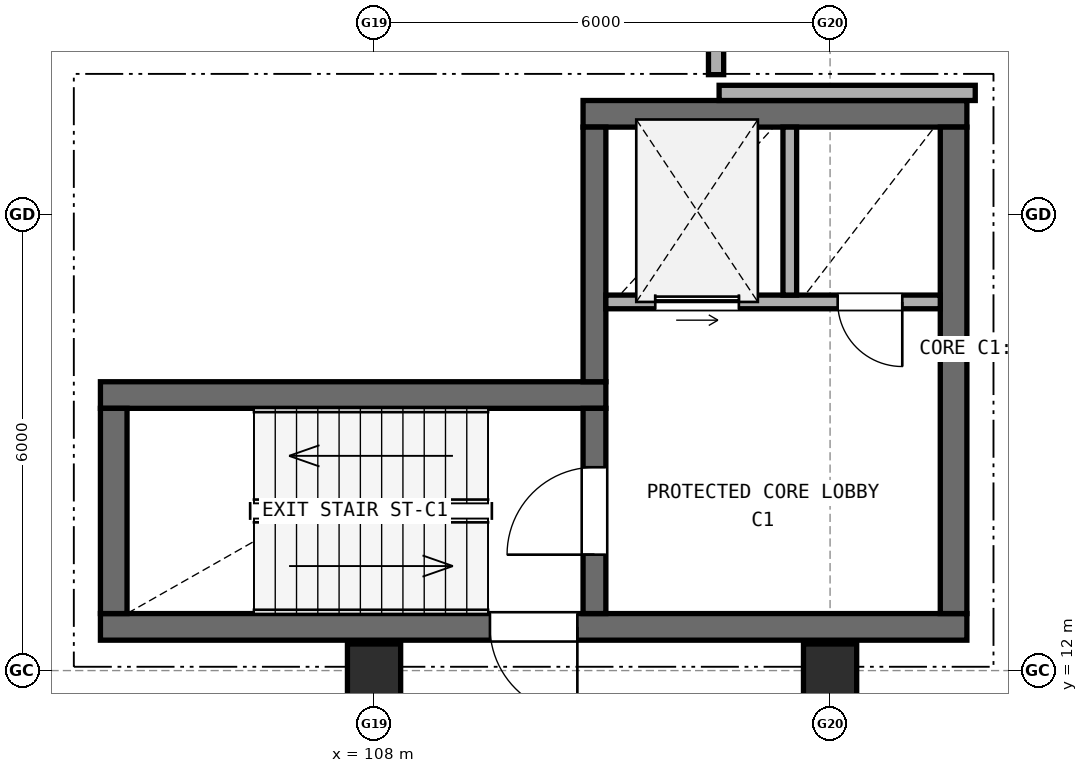
"""IFC4 building model, lengths in metres.
Left out: names, types, materials, properties, quantities, classifications, styles, units other than length and angle.
Written with IfcOpenShell. Run it as: python <this file> out.ifc"""

import sys

from ifc_helpers import new_model, si_unit, direction, frame, frame_2d, origin, origin_2d, place, context, subcontext, project, spatial, rectangle, extrude, element, fill, save


model = new_model("IFC4")
c1 = context("Model", 3, precision=1e-05, world=origin(), true_north=direction((0.0, 1.0)))
c2 = subcontext(c1, "Body", "Model", "MODEL_VIEW")
j1 = project(units=[si_unit("LENGTHUNIT", "METRE"), si_unit("PLANEANGLEUNIT", "RADIAN")], contexts=[c1])
p1 = place(None, origin())
s1 = spatial("IfcSite", under=j1, at=p1, CompositionType="ELEMENT")
p2 = place(p1, origin())
s2 = spatial("IfcBuilding", under=s1, at=p2, CompositionType="ELEMENT")
p3 = place(p2, origin())
s3 = spatial("IfcBuildingStorey", under=s2, at=p3, CompositionType="ELEMENT", Elevation=0.0)
for number, where, z_axis, x_axis in (
    (1, (108.0, 12.0, 0.0), (0.0, 0.0, 1.0), (1.0, 0.0, 0.0)),
    (2, (114.0, 12.0, 0.0), (0.0, 0.0, 1.0), (1.0, 0.0, 0.0)),
):
    element("IfcColumn", number, at=place(p3, frame(where, z_axis=z_axis, x_axis=x_axis)), inside=s3, PredefinedType="COLUMN", context=c2, shape_type="SweptSolid", body=[
        extrude(rectangle(XDim=0.7, YDim=0.7, at=origin_2d()), origin(), (0.0, 0.0, 1.0), 4.23),
    ])
p4 = place(p3, frame((104.4, 12.575, 0.0), z_axis=(0.0, 0.0, 1.0), x_axis=(1.0, 0.0, 0.0)))
e3 = element("IfcWall", 3, at=p4, inside=s3, PredefinedType="SHEAR", context=c2, shape_type="SweptSolid", body=[
    extrude(rectangle(XDim=11.4, YDim=0.35, at=frame_2d((5.7, 0.0))), origin(), (0.0, 0.0, 1.0), 4.23),
])
p5 = place(p4, frame((5.125, 0.0, 0.0)))
e4 = element("IfcOpeningElement", 4, at=p5, cuts=e3, PredefinedType="OPENING", context=c2, shape_type="SweptSolid", body=[
    extrude(rectangle(XDim=1.15, YDim=2.15, at=frame_2d((0.575, 1.075))), frame((0.0, 0.185, 0.0), z_axis=(0.0, -1.0, 0.0), x_axis=(1.0, 0.0, 0.0)), (0.0, 0.0, 1.0), 0.37),
])
p6 = place(p3, frame((111.05, 15.625, 0.0), z_axis=(0.0, 0.0, 1.0), x_axis=(-1.0, 0.0, 0.0)))
e5 = element("IfcWall", 5, at=p6, inside=s3, PredefinedType="SHEAR", context=c2, shape_type="SweptSolid", body=[
    extrude(rectangle(XDim=6.65, YDim=0.35, at=frame_2d((3.325, 0.0))), origin(), (0.0, 0.0, 1.0), 4.23),
])
p7 = place(p3, frame((104.575, 15.45, 0.0), z_axis=(0.0, 0.0, 1.0), x_axis=(0.0, -1.0, 0.0)))
e6 = element("IfcWall", 6, at=p7, inside=s3, PredefinedType="SHEAR", context=c2, shape_type="SweptSolid", body=[
    extrude(rectangle(XDim=2.7, YDim=0.35, at=frame_2d((1.35, 0.0))), origin(), (0.0, 0.0, 1.0), 4.23),
])
p8 = place(p3, frame((110.9, 12.75, 0.0), z_axis=(0.0, 0.0, 1.0), x_axis=(0.0, 1.0, 0.0)))
e7 = element("IfcWall", 7, at=p8, inside=s3, PredefinedType="SHEAR", context=c2, shape_type="SweptSolid", body=[
    extrude(rectangle(XDim=2.7, YDim=0.3, at=frame_2d((1.35, 0.0))), origin(), (0.0, 0.0, 1.0), 4.23),
])
p9 = place(p8, frame((0.775, 0.0, 0.0)))
e8 = element("IfcOpeningElement", 8, at=p9, cuts=e7, PredefinedType="OPENING", context=c2, shape_type="SweptSolid", body=[
    extrude(rectangle(XDim=1.15, YDim=2.15, at=frame_2d((0.575, 1.075))), frame((0.0, 0.16, 0.0), z_axis=(0.0, -1.0, 0.0), x_axis=(1.0, 0.0, 0.0)), (0.0, 0.0, 1.0), 0.32),
])
p10 = place(p3, frame((115.8, 19.325, 0.0), z_axis=(0.0, 0.0, 1.0), x_axis=(-1.0, 0.0, 0.0)))
e9 = element("IfcWall", 9, at=p10, inside=s3, PredefinedType="SHEAR", context=c2, shape_type="SweptSolid", body=[
    extrude(rectangle(XDim=5.05, YDim=0.35, at=frame_2d((2.525, 0.0))), origin(), (0.0, 0.0, 1.0), 4.23),
])
p11 = place(p3, frame((115.625, 12.75, 0.0), z_axis=(0.0, 0.0, 1.0), x_axis=(0.0, 1.0, 0.0)))
e10 = element("IfcWall", 10, at=p11, inside=s3, PredefinedType="SHEAR", context=c2, shape_type="SweptSolid", body=[
    extrude(rectangle(XDim=6.4, YDim=0.35, at=frame_2d((3.2, 0.0))), origin(), (0.0, 0.0, 1.0), 4.23),
])
p12 = place(p3, frame((110.9, 15.8, 0.0), z_axis=(0.0, 0.0, 1.0), x_axis=(0.0, 1.0, 0.0)))
e11 = element("IfcWall", 11, at=p12, inside=s3, PredefinedType="SHEAR", context=c2, shape_type="SweptSolid", body=[
    extrude(rectangle(XDim=3.35, YDim=0.3, at=frame_2d((1.675, 0.0))), origin(), (0.0, 0.0, 1.0), 4.23),
])
p13 = place(p3, frame((111.05, 16.85, 0.0), z_axis=(0.0, 0.0, 1.0), x_axis=(1.0, 0.0, 0.0)))
e12 = element("IfcWall", 12, at=p13, inside=s3, PredefinedType="SOLIDWALL", context=c2, shape_type="SweptSolid", body=[
    extrude(rectangle(XDim=4.4, YDim=0.18, at=frame_2d((2.2, 0.0))), origin(), (0.0, 0.0, 1.0), 4.23),
])
p14 = place(p13, frame((0.65, 0.0, 0.0)))
e13 = element("IfcOpeningElement", 13, at=p14, cuts=e12, PredefinedType="OPENING", context=c2, shape_type="SweptSolid", body=[
    extrude(rectangle(XDim=1.1, YDim=2.15, at=frame_2d((0.55, 1.075))), frame((0.0, 0.1, 0.0), z_axis=(0.0, -1.0, 0.0), x_axis=(1.0, 0.0, 0.0)), (0.0, 0.0, 1.0), 0.2),
])
p15 = place(p13, frame((3.05, 0.0, 0.0)))
e14 = element("IfcOpeningElement", 14, at=p15, cuts=e12, PredefinedType="OPENING", context=c2, shape_type="SweptSolid", body=[
    extrude(rectangle(XDim=0.85, YDim=2.1, at=frame_2d((0.425, 1.05))), frame((0.0, 0.1, 0.0), z_axis=(0.0, -1.0, 0.0), x_axis=(1.0, 0.0, 0.0)), (0.0, 0.0, 1.0), 0.2),
])
p16 = place(p3, frame((113.47, 16.94, 0.0), z_axis=(0.0, 0.0, 1.0), x_axis=(0.0, 1.0, 0.0)))
e15 = element("IfcWall", 15, at=p16, inside=s3, PredefinedType="SOLIDWALL", context=c2, shape_type="SweptSolid", body=[
    extrude(rectangle(XDim=2.21, YDim=0.18, at=frame_2d((1.105, 0.0))), origin(), (0.0, 0.0, 1.0), 4.23),
])
p17 = place(p3, frame((112.54, 19.6, 0.0), z_axis=(0.0, 0.0, 1.0), x_axis=(1.0, 0.0, 0.0)))
e16 = element("IfcWall", 16, at=p17, inside=s3, PredefinedType="SOLIDWALL", context=c2, shape_type="SweptSolid", body=[
    extrude(rectangle(XDim=3.37, YDim=0.2, at=frame_2d((1.685, 0.0))), origin(), (0.0, 0.0, 1.0), 2.912),
])
p18 = place(p3, frame((112.5, 19.84, 0.0), z_axis=(0.0, 0.0, 1.0), x_axis=(0.0, 1.0, 0.0)))
e17 = element("IfcWall", 17, at=p18, inside=s3, PredefinedType="SOLIDWALL", context=c2, shape_type="SweptSolid", body=[
    extrude(rectangle(XDim=15.72, YDim=0.2, at=frame_2d((7.86, 0.0))), origin(), (0.0, 0.0, 1.0), 3.562),
])
p19 = place(p18, frame((7.335, 0.0, 0.0)))
e18 = element("IfcOpeningElement", 18, at=p19, cuts=e17, PredefinedType="OPENING", context=c2, shape_type="SweptSolid", body=[
    extrude(rectangle(XDim=1.05, YDim=2.15, at=frame_2d((0.525, 1.075))), frame((0.0, 0.11, 0.0), z_axis=(0.0, -1.0, 0.0), x_axis=(1.0, 0.0, 0.0)), (0.0, 0.0, 1.0), 0.22),
])
p20 = place(p5, origin())
e19 = element("IfcDoor", 19, at=p20, inside=s3, OperationType="SINGLE_SWING_RIGHT", PredefinedType="DOOR", context=c2, shape_type="SweptSolid", body=[
    extrude(rectangle(XDim=1.15, YDim=2.15, at=frame_2d((0.575, 1.075))), frame((0.0, 0.025, 0.0), z_axis=(0.0, -1.0, 0.0), x_axis=(1.0, 0.0, 0.0)), (0.0, 0.0, 1.0), 0.05),
])
fill(e4, e19)
p21 = place(p9, origin())
e20 = element("IfcDoor", 20, at=p21, inside=s3, OperationType="SINGLE_SWING_LEFT", PredefinedType="DOOR", context=c2, shape_type="SweptSolid", body=[
    extrude(rectangle(XDim=1.15, YDim=2.15, at=frame_2d((0.575, 1.075))), frame((0.0, 0.025, 0.0), z_axis=(0.0, -1.0, 0.0), x_axis=(1.0, 0.0, 0.0)), (0.0, 0.0, 1.0), 0.05),
])
fill(e8, e20)
p22 = place(p14, origin())
e21 = element("IfcDoor", 21, at=p22, inside=s3, OperationType="SLIDING_TO_LEFT", PredefinedType="DOOR", context=c2, shape_type="SweptSolid", body=[
    extrude(rectangle(XDim=1.1, YDim=2.15, at=frame_2d((0.55, 1.075))), frame((0.0, 0.025, 0.0), z_axis=(0.0, -1.0, 0.0), x_axis=(1.0, 0.0, 0.0)), (0.0, 0.0, 1.0), 0.05),
])
fill(e13, e21)
p23 = place(p15, frame((0.85, 0.0, 0.0), z_axis=(0.0, 0.0, 1.0), x_axis=(-1.0, 0.0, 0.0)))
e22 = element("IfcDoor", 22, at=p23, inside=s3, OperationType="SINGLE_SWING_RIGHT", PredefinedType="DOOR", context=c2, shape_type="SweptSolid", body=[
    extrude(rectangle(XDim=0.85, YDim=2.1, at=frame_2d((0.425, 1.05))), frame((0.0, 0.025, 0.0), z_axis=(0.0, -1.0, 0.0), x_axis=(1.0, 0.0, 0.0)), (0.0, 0.0, 1.0), 0.05),
])
fill(e14, e22)
save(model, sys.argv[1])
